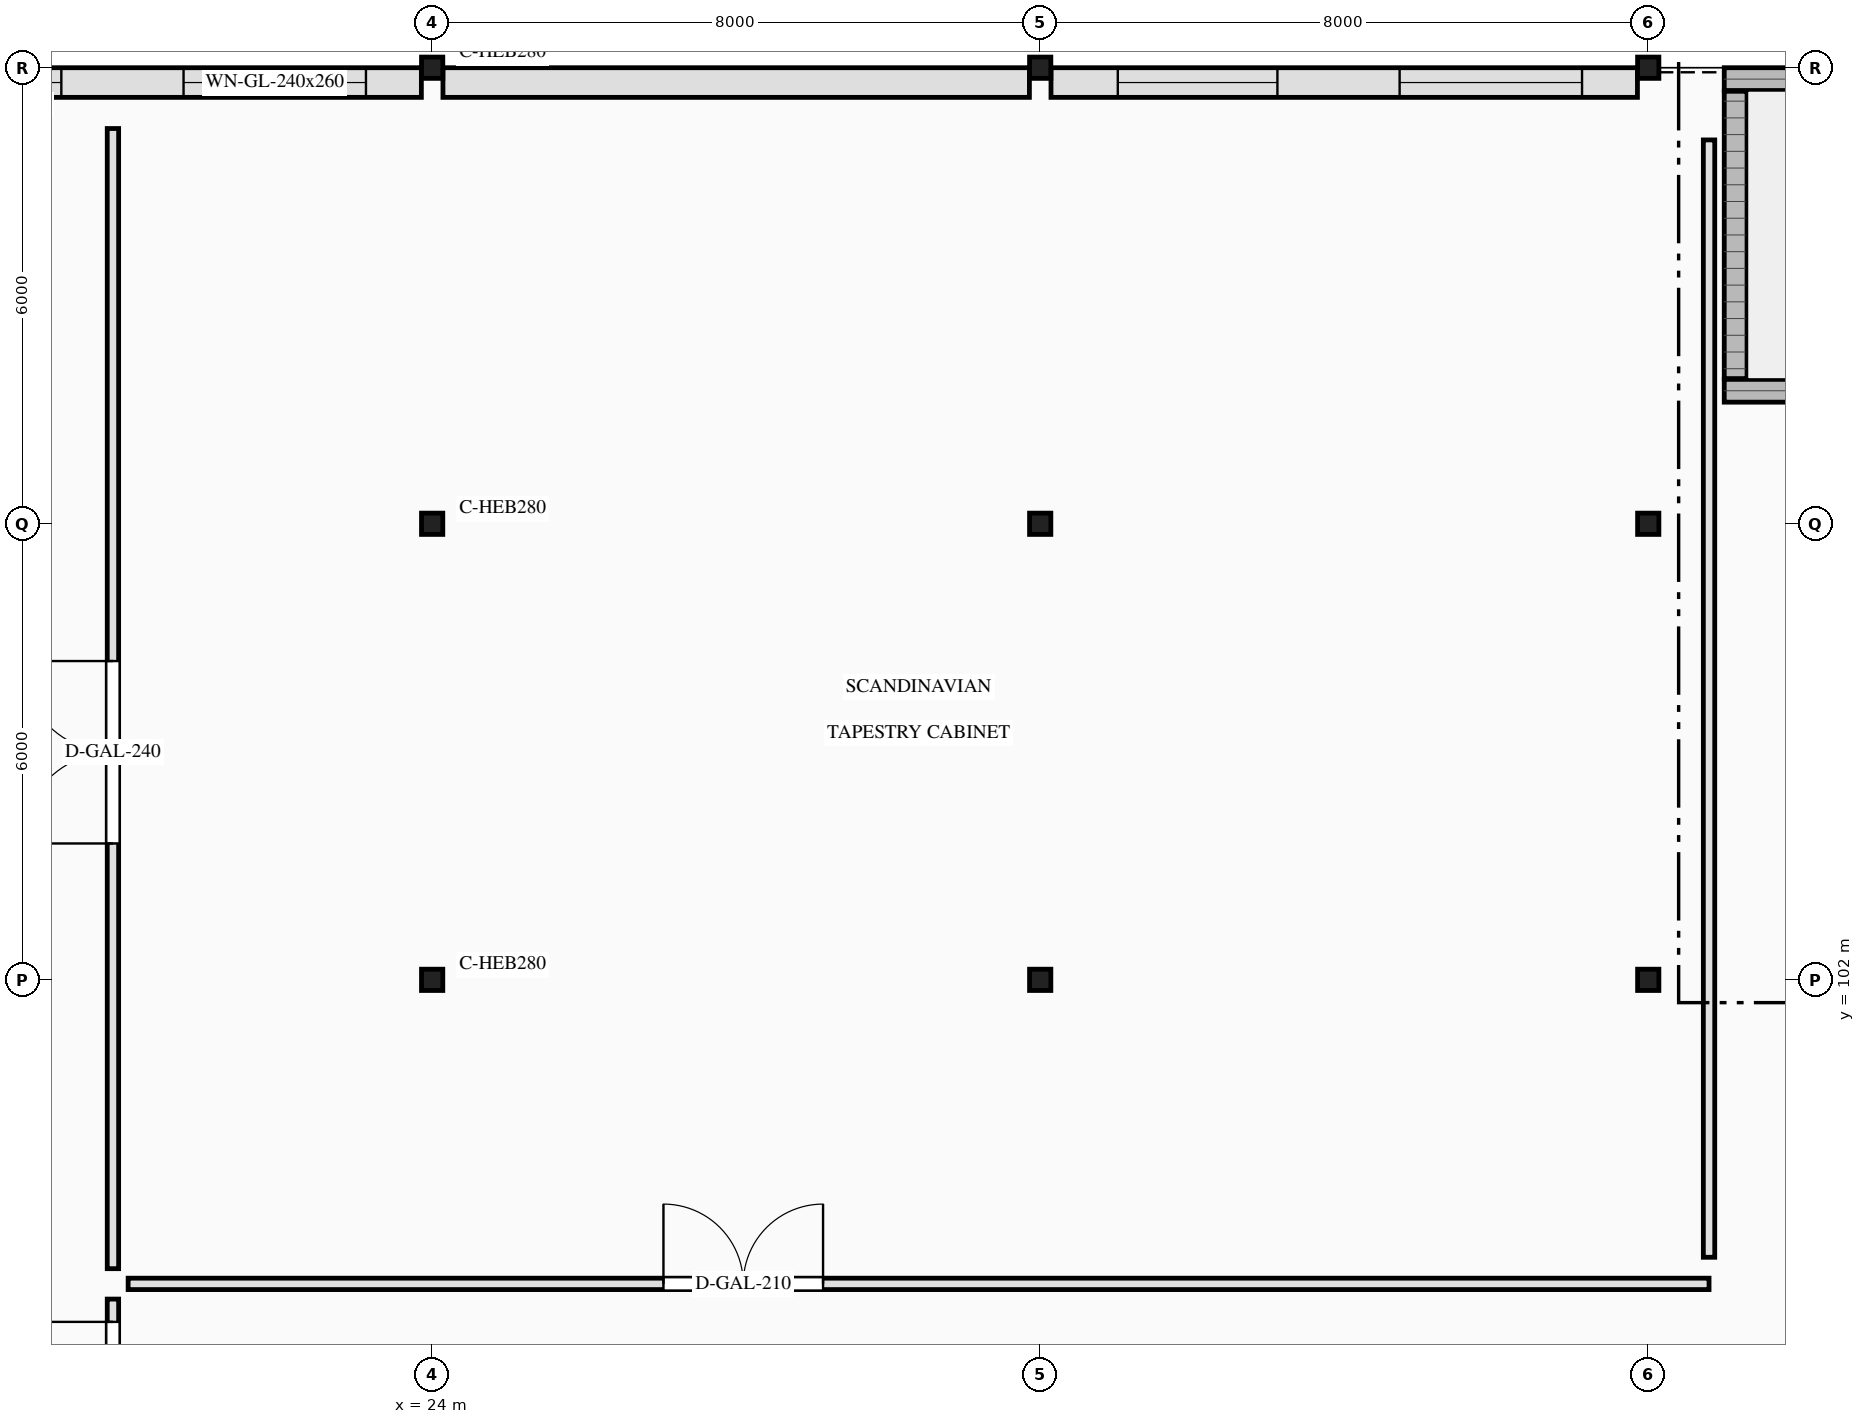
"""IFC4 building model, lengths in metres.
Left out: names, types, materials, properties, quantities, classifications, styles, units other than length and angle.
Written with IfcOpenShell. Run it as: python <this file> out.ifc"""

import sys

from ifc_helpers import new_model, si_unit, direction, frame, frame_2d, origin, origin_2d, place, context, subcontext, project, spatial, rectangle, i_section, extrude, element, fill, save


model = new_model("IFC4")
c1 = context("Model", 3, precision=1e-05, world=origin(), true_north=direction((0.0, 1.0)))
c2 = subcontext(c1, "Body", "Model", "MODEL_VIEW")
j1 = project(units=[si_unit("LENGTHUNIT", "METRE"), si_unit("PLANEANGLEUNIT", "RADIAN")], contexts=[c1])
p1 = place(None, origin())
s1 = spatial("IfcSite", under=j1, at=p1, CompositionType="ELEMENT")
p2 = place(p1, origin())
s2 = spatial("IfcBuilding", under=s1, at=p2, CompositionType="ELEMENT")
p3 = place(p2, frame((0.0, 0.0, 5.4)))
s3 = spatial("IfcBuildingStorey", under=s2, at=p3, CompositionType="ELEMENT", Elevation=5.4)
for number, where, z_axis, x_axis in (
    (1, (41.0, 109.75, 0.0), (0.0, 0.0, 1.0), (1.0, 0.0, 0.0)),
    (2, (41.0, 113.85, 0.0), (0.0, 0.0, 1.0), (1.0, 0.0, 0.0)),
):
    element("IfcWall", number, at=place(p3, frame(where, z_axis=z_axis, x_axis=x_axis)), inside=s3, PredefinedType="SHEAR", context=c2, shape_type="SweptSolid", body=[
        extrude(rectangle(XDim=10.0, YDim=0.3, at=frame_2d((5.0, 0.0))), origin(), (0.0, 0.0, 1.0), 4.2),
    ])
p4 = place(p3, frame((41.15, 109.91, 0.0), z_axis=(0.0, 0.0, 1.0), x_axis=(0.0, 1.0, 0.0)))
e3 = element("IfcWall", 3, at=p4, inside=s3, PredefinedType="SHEAR", context=c2, shape_type="SweptSolid", body=[
    extrude(rectangle(XDim=3.78, YDim=0.3, at=frame_2d((1.89, 0.0))), origin(), (0.0, 0.0, 1.0), 4.2),
])
for number, where, z_axis, x_axis in (
    (4, (24.0, 102.0, 0.0), (0.0, 0.0, 1.0), (1.0, 0.0, 0.0)),
    (5, (24.0, 108.0, 0.0), (0.0, 0.0, 1.0), (1.0, 0.0, 0.0)),
    (6, (24.0, 114.0, 0.0), (0.0, 0.0, 1.0), (1.0, 0.0, 0.0)),
    (7, (32.0, 102.0, 0.0), (0.0, 0.0, 1.0), (1.0, 0.0, 0.0)),
    (8, (32.0, 108.0, 0.0), (0.0, 0.0, 1.0), (1.0, 0.0, 0.0)),
    (9, (32.0, 114.0, 0.0), (0.0, 0.0, 1.0), (1.0, 0.0, 0.0)),
    (10, (40.0, 102.0, 0.0), (0.0, 0.0, 1.0), (1.0, 0.0, 0.0)),
    (11, (40.0, 108.0, 0.0), (0.0, 0.0, 1.0), (1.0, 0.0, 0.0)),
    (12, (40.0, 114.0, 0.0), (0.0, 0.0, 1.0), (1.0, 0.0, 0.0)),
):
    element("IfcColumn", number, at=place(p3, frame(where, z_axis=z_axis, x_axis=x_axis)), inside=s3, PredefinedType="COLUMN", context=c2, shape_type="SweptSolid", body=[
        extrude(i_section(OverallWidth=0.28, OverallDepth=0.28, WebThickness=0.01, FlangeThickness=0.018, FilletRadius=0.024, at=origin_2d()), origin(), (0.0, 0.0, 1.0), 4.2),
    ])
p5 = place(p3, frame((16.142, 113.805, 0.0), z_axis=(0.0, 0.0, 1.0), x_axis=(1.0, 0.0, 0.0)))
e13 = element("IfcWall", 13, at=p5, inside=s3, PredefinedType="SOLIDWALL", context=c2, shape_type="SweptSolid", body=[
    extrude(rectangle(XDim=7.716, YDim=0.39, at=frame_2d((3.858, 0.0))), origin(), (0.0, 0.0, 1.0), 3.455),
])
p6 = place(p5, frame((0.879, 0.0, 0.82)))
e14 = element("IfcOpeningElement", 14, at=p6, cuts=e13, PredefinedType="OPENING", context=c2, shape_type="SweptSolid", body=[
    extrude(rectangle(XDim=2.1, YDim=2.5, at=frame_2d((1.05, 1.25))), frame((0.0, 0.205, 0.0), z_axis=(0.0, -1.0, 0.0), x_axis=(1.0, 0.0, 0.0)), (0.0, 0.0, 1.0), 0.41),
])
p7 = place(p5, frame((4.587, 0.0, 0.72)))
e15 = element("IfcOpeningElement", 15, at=p7, cuts=e13, PredefinedType="OPENING", context=c2, shape_type="SweptSolid", body=[
    extrude(rectangle(XDim=2.4, YDim=2.6, at=frame_2d((1.2, 1.3))), frame((0.0, 0.205, 0.0), z_axis=(0.0, -1.0, 0.0), x_axis=(1.0, 0.0, 0.0)), (0.0, 0.0, 1.0), 0.41),
])
p8 = place(p3, frame((24.142, 113.805, 0.0), z_axis=(0.0, 0.0, 1.0), x_axis=(1.0, 0.0, 0.0)))
e16 = element("IfcWall", 16, at=p8, inside=s3, PredefinedType="SOLIDWALL", context=c2, shape_type="SweptSolid", body=[
    extrude(rectangle(XDim=7.716, YDim=0.39, at=frame_2d((3.858, 0.0))), origin(), (0.0, 0.0, 1.0), 3.455),
])
p9 = place(p3, frame((32.142, 113.805, 0.0), z_axis=(0.0, 0.0, 1.0), x_axis=(1.0, 0.0, 0.0)))
e17 = element("IfcWall", 17, at=p9, inside=s3, PredefinedType="SOLIDWALL", context=c2, shape_type="SweptSolid", body=[
    extrude(rectangle(XDim=7.716, YDim=0.39, at=frame_2d((3.858, 0.0))), origin(), (0.0, 0.0, 1.0), 3.455),
])
p10 = place(p9, frame((0.879, 0.0, 0.82)))
e18 = element("IfcOpeningElement", 18, at=p10, cuts=e17, PredefinedType="OPENING", context=c2, shape_type="SweptSolid", body=[
    extrude(rectangle(XDim=2.1, YDim=2.5, at=frame_2d((1.05, 1.25))), frame((0.0, 0.205, 0.0), z_axis=(0.0, -1.0, 0.0), x_axis=(1.0, 0.0, 0.0)), (0.0, 0.0, 1.0), 0.41),
])
p11 = place(p9, frame((4.587, 0.0, 0.72)))
e19 = element("IfcOpeningElement", 19, at=p11, cuts=e17, PredefinedType="OPENING", context=c2, shape_type="SweptSolid", body=[
    extrude(rectangle(XDim=2.4, YDim=2.6, at=frame_2d((1.2, 1.3))), frame((0.0, 0.205, 0.0), z_axis=(0.0, -1.0, 0.0), x_axis=(1.0, 0.0, 0.0)), (0.0, 0.0, 1.0), 0.41),
])
p12 = place(p3, frame((19.8, 94.2, 0.0), z_axis=(0.0, 0.0, 1.0), x_axis=(0.0, 1.0, 0.0)))
e20 = element("IfcWall", 20, at=p12, inside=s3, PredefinedType="PARTITIONING", context=c2, shape_type="SweptSolid", body=[
    extrude(rectangle(XDim=3.6, YDim=0.15, at=frame_2d((1.8, 0.0))), origin(), (0.0, 0.0, 1.0), 3.96),
])
p13 = place(p12, frame((0.9, 0.0, 0.0)))
e21 = element("IfcOpeningElement", 21, at=p13, cuts=e20, PredefinedType="OPENING", context=c2, shape_type="SweptSolid", body=[
    extrude(rectangle(XDim=2.4, YDim=2.75, at=frame_2d((1.2, 1.375))), frame((0.0, 0.085, 0.0), z_axis=(0.0, -1.0, 0.0), x_axis=(1.0, 0.0, 0.0)), (0.0, 0.0, 1.0), 0.17),
])
p14 = place(p3, frame((20.0, 98.0, 0.0), z_axis=(0.0, 0.0, 1.0), x_axis=(1.0, 0.0, 0.0)))
e22 = element("IfcWall", 22, at=p14, inside=s3, PredefinedType="PARTITIONING", context=c2, shape_type="SweptSolid", body=[
    extrude(rectangle(XDim=20.8, YDim=0.15, at=frame_2d((10.4, 0.0))), origin(), (0.0, 0.0, 1.0), 3.96),
])
p15 = place(p14, frame((7.043, 0.0, 0.0)))
e23 = element("IfcOpeningElement", 23, at=p15, cuts=e22, PredefinedType="OPENING", context=c2, shape_type="SweptSolid", body=[
    extrude(rectangle(XDim=2.1, YDim=2.6, at=frame_2d((1.05, 1.3))), frame((0.0, 0.085, 0.0), z_axis=(0.0, -1.0, 0.0), x_axis=(1.0, 0.0, 0.0)), (0.0, 0.0, 1.0), 0.17),
])
p16 = place(p3, frame((19.8, 98.2, 0.0), z_axis=(0.0, 0.0, 1.0), x_axis=(0.0, 1.0, 0.0)))
e24 = element("IfcWall", 24, at=p16, inside=s3, PredefinedType="PARTITIONING", context=c2, shape_type="SweptSolid", body=[
    extrude(rectangle(XDim=15.0, YDim=0.15, at=frame_2d((7.5, 0.0))), origin(), (0.0, 0.0, 1.0), 3.96),
])
p17 = place(p16, frame((5.594, 0.0, 0.0)))
e25 = element("IfcOpeningElement", 25, at=p17, cuts=e24, PredefinedType="OPENING", context=c2, shape_type="SweptSolid", body=[
    extrude(rectangle(XDim=2.4, YDim=2.75, at=frame_2d((1.2, 1.375))), frame((0.0, 0.085, 0.0), z_axis=(0.0, -1.0, 0.0), x_axis=(1.0, 0.0, 0.0)), (0.0, 0.0, 1.0), 0.17),
])
p18 = place(p3, frame((40.8, 98.35, 0.0), z_axis=(0.0, 0.0, 1.0), x_axis=(0.0, 1.0, 0.0)))
e26 = element("IfcWall", 26, at=p18, inside=s3, PredefinedType="PARTITIONING", context=c2, shape_type="SweptSolid", body=[
    extrude(rectangle(XDim=14.7, YDim=0.15, at=frame_2d((7.35, 0.0))), origin(), (0.0, 0.0, 1.0), 3.96),
])
p19 = place(p6, origin())
e27 = element("IfcWindow", 27, at=p19, inside=s3, PartitioningType="DOUBLE_PANEL_VERTICAL", PredefinedType="WINDOW", context=c2, shape_type="SweptSolid", body=[
    extrude(rectangle(XDim=2.1, YDim=2.5, at=frame_2d((1.05, 1.25))), frame((0.0, 0.03, 0.0), z_axis=(0.0, -1.0, 0.0), x_axis=(1.0, 0.0, 0.0)), (0.0, 0.0, 1.0), 0.06),
])
fill(e14, e27)
p20 = place(p7, origin())
e28 = element("IfcWindow", 28, at=p20, inside=s3, PartitioningType="TRIPLE_PANEL_VERTICAL", PredefinedType="WINDOW", context=c2, shape_type="SweptSolid", body=[
    extrude(rectangle(XDim=2.4, YDim=2.6, at=frame_2d((1.2, 1.3))), frame((0.0, 0.03, 0.0), z_axis=(0.0, -1.0, 0.0), x_axis=(1.0, 0.0, 0.0)), (0.0, 0.0, 1.0), 0.06),
])
fill(e15, e28)
p21 = place(p10, origin())
e29 = element("IfcWindow", 29, at=p21, inside=s3, PartitioningType="DOUBLE_PANEL_VERTICAL", PredefinedType="WINDOW", context=c2, shape_type="SweptSolid", body=[
    extrude(rectangle(XDim=2.1, YDim=2.5, at=frame_2d((1.05, 1.25))), frame((0.0, 0.03, 0.0), z_axis=(0.0, -1.0, 0.0), x_axis=(1.0, 0.0, 0.0)), (0.0, 0.0, 1.0), 0.06),
])
fill(e18, e29)
p22 = place(p11, origin())
e30 = element("IfcWindow", 30, at=p22, inside=s3, PartitioningType="TRIPLE_PANEL_VERTICAL", PredefinedType="WINDOW", context=c2, shape_type="SweptSolid", body=[
    extrude(rectangle(XDim=2.4, YDim=2.6, at=frame_2d((1.2, 1.3))), frame((0.0, 0.03, 0.0), z_axis=(0.0, -1.0, 0.0), x_axis=(1.0, 0.0, 0.0)), (0.0, 0.0, 1.0), 0.06),
])
fill(e19, e30)
p23 = place(p13, origin())
e31 = element("IfcDoor", 31, at=p23, inside=s3, OperationType="DOUBLE_DOOR_DOUBLE_SWING", PredefinedType="DOOR", context=c2, shape_type="SweptSolid", body=[
    extrude(rectangle(XDim=2.4, YDim=2.75, at=frame_2d((1.2, 1.375))), frame((0.0, 0.025, 0.0), z_axis=(0.0, -1.0, 0.0), x_axis=(1.0, 0.0, 0.0)), (0.0, 0.0, 1.0), 0.05),
])
fill(e21, e31)
p24 = place(p15, origin())
e32 = element("IfcDoor", 32, at=p24, inside=s3, OperationType="DOUBLE_DOOR_SINGLE_SWING", PredefinedType="DOOR", context=c2, shape_type="SweptSolid", body=[
    extrude(rectangle(XDim=2.1, YDim=2.6, at=frame_2d((1.05, 1.3))), frame((0.0, 0.025, 0.0), z_axis=(0.0, -1.0, 0.0), x_axis=(1.0, 0.0, 0.0)), (0.0, 0.0, 1.0), 0.05),
])
fill(e23, e32)
p25 = place(p17, origin())
e33 = element("IfcDoor", 33, at=p25, inside=s3, OperationType="DOUBLE_DOOR_DOUBLE_SWING", PredefinedType="DOOR", context=c2, shape_type="SweptSolid", body=[
    extrude(rectangle(XDim=2.4, YDim=2.75, at=frame_2d((1.2, 1.375))), frame((0.0, 0.025, 0.0), z_axis=(0.0, -1.0, 0.0), x_axis=(1.0, 0.0, 0.0)), (0.0, 0.0, 1.0), 0.05),
])
fill(e25, e33)
save(model, sys.argv[1])
